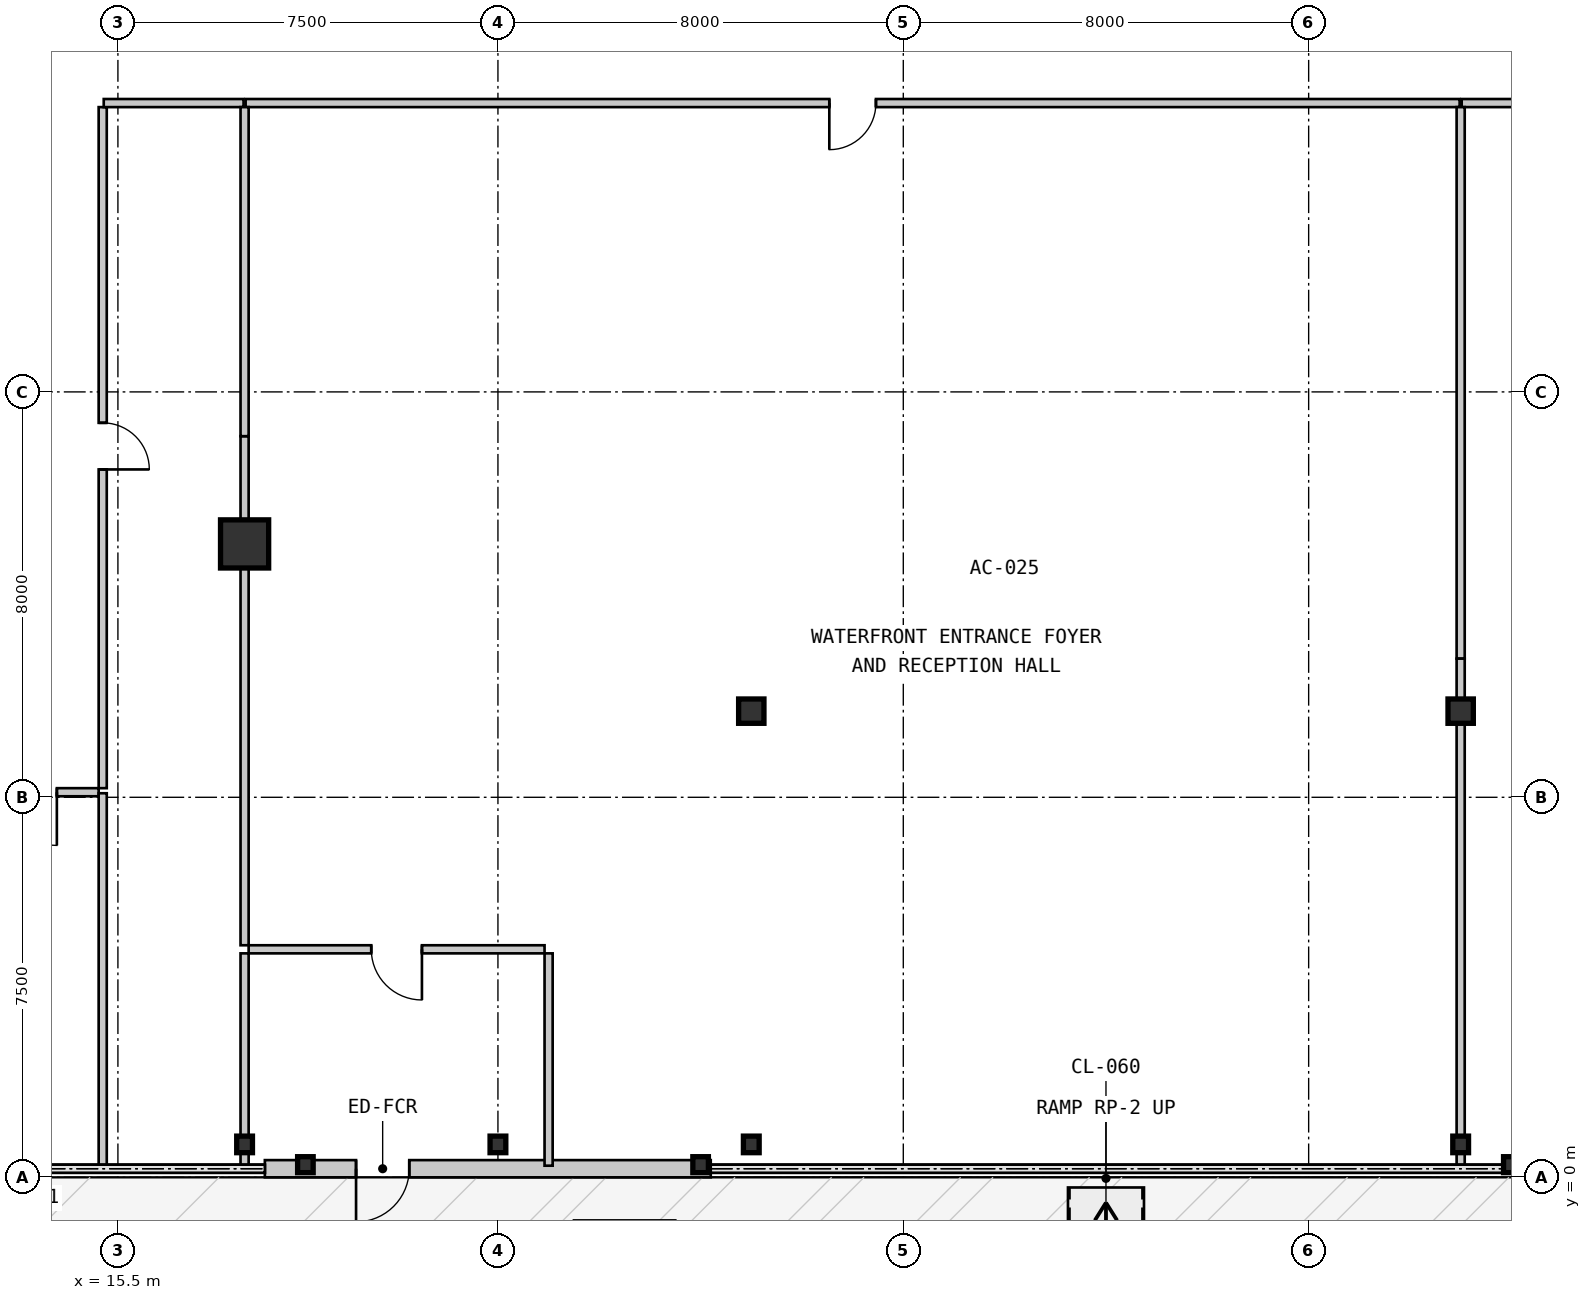
"""IFC4 building model, lengths in metres.
Left out: names, types, materials, properties, quantities, classifications, styles, units other than length and angle.
Written with IfcOpenShell. Run it as: python <this file> out.ifc"""

import sys

from ifc_helpers import new_model, si_unit, direction, frame, frame_2d, origin, origin_2d, place, context, subcontext, project, spatial, rectangle, i_section, extrude, source, transform, mapped, element, fill, save


model = new_model("IFC4")
c1 = context("Model", 3, precision=1e-05, world=origin(), true_north=direction((0.0, 1.0)))
c2 = subcontext(c1, "Body", "Model", "MODEL_VIEW")
j1 = project(units=[si_unit("LENGTHUNIT", "METRE"), si_unit("PLANEANGLEUNIT", "RADIAN")], contexts=[c1])
p1 = place(None, origin())
s1 = spatial("IfcSite", under=j1, at=p1, CompositionType="ELEMENT")
p2 = place(p1, origin())
s2 = spatial("IfcBuilding", under=s1, at=p2, CompositionType="ELEMENT")
p3 = place(p2, origin())
s3 = spatial("IfcBuildingStorey", under=s2, at=p3, CompositionType="ELEMENT", Elevation=0.0)
m1 = source(origin(), c2, "Body", "SweptSolid", [
    extrude(i_section(OverallWidth=0.5, OverallDepth=0.48, WebThickness=0.028, FlangeThickness=0.044, at=origin_2d()), origin(), (0.0, 0.0, 1.0), 4.55),
])
for number, where, z_axis, x_axis in (
    (1, (28.0, 9.2, 0.0), (0.0, 0.0, 1.0), (1.0, 0.0, 0.0)),
    (2, (42.0, 9.2, 0.0), (0.0, 0.0, 1.0), (1.0, 0.0, 0.0)),
):
    element("IfcColumn", number, at=place(p3, frame(where, z_axis=z_axis, x_axis=x_axis)), inside=s3, PredefinedType="COLUMN", context=c2, shape_type="MappedRepresentation", body=[
        mapped(m1, transform((0.0, 0.0, 0.0), scale=1.0)),
    ])
m2 = source(origin(), c2, "Body", "SweptSolid", [
    extrude(rectangle(XDim=0.95, YDim=0.95, at=origin_2d()), origin(), (0.0, 0.0, 1.0), 4.55),
])
p4 = place(p3, frame((18.0, 12.5, 0.0), z_axis=(0.0, 0.0, 1.0), x_axis=(1.0, 0.0, 0.0)))
e3 = element("IfcColumn", 3, at=p4, inside=s3, PredefinedType="COLUMN", context=c2, shape_type="MappedRepresentation", body=[
    mapped(m2, transform((0.0, 0.0, 0.0), scale=1.0)),
])
m3 = source(origin(), c2, "Body", "SweptSolid", [
    extrude(i_section(OverallWidth=0.311, OverallDepth=0.327, WebThickness=0.016, FlangeThickness=0.025, at=origin_2d()), origin(), (0.0, 0.0, 1.0), 4.55),
])
for number, where, z_axis, x_axis in (
    (4, (28.0, 0.65, 0.0), (0.0, 0.0, 1.0), (1.0, 0.0, 0.0)),
    (5, (42.0, 0.65, 0.0), (0.0, 0.0, 1.0), (1.0, 0.0, 0.0)),
    (6, (18.0, 0.65, 0.0), (0.0, 0.0, 1.0), (1.0, 0.0, 0.0)),
    (7, (23.0, 0.65, 0.0), (0.0, 0.0, 1.0), (1.0, 0.0, 0.0)),
):
    element("IfcColumn", number, at=place(p3, frame(where, z_axis=z_axis, x_axis=x_axis)), inside=s3, PredefinedType="COLUMN", context=c2, shape_type="MappedRepresentation", body=[
        mapped(m3, transform((0.0, 0.0, 0.0), scale=1.0)),
    ])
m4 = source(origin(), c2, "Body", "SweptSolid", [
    extrude(i_section(OverallWidth=0.307, OverallDepth=0.315, WebThickness=0.012, FlangeThickness=0.019, at=origin_2d()), origin(), (0.0, 0.0, 1.0), 4.55),
])
for number, where, z_axis, x_axis in (
    (8, (19.2, 0.25, 0.0), (0.0, 0.0, 1.0), (1.0, 0.0, 0.0)),
    (9, (27.0, 0.25, 0.0), (0.0, 0.0, 1.0), (1.0, 0.0, 0.0)),
    (10, (43.0, 0.25, 0.0), (0.0, 0.0, 1.0), (1.0, 0.0, 0.0)),
):
    element("IfcColumn", number, at=place(p3, frame(where, z_axis=z_axis, x_axis=x_axis)), inside=s3, PredefinedType="PILASTER", context=c2, shape_type="MappedRepresentation", body=[
        mapped(m4, transform((0.0, 0.0, 0.0), scale=1.0)),
    ])
m5 = source(origin(), c2, "Body", "SweptSolid", [
    extrude(rectangle(XDim=8.8, YDim=0.34, at=frame_2d((4.4, 0.0))), origin(), (0.0, 0.0, 1.0), 4.29),
])
p5 = place(p3, frame((18.4, 0.17, 0.0), z_axis=(0.0, 0.0, 1.0), x_axis=(1.0, 0.0, 0.0)))
e11 = element("IfcWall", 11, at=p5, inside=s3, PredefinedType="SOLIDWALL", context=c2, shape_type="MappedRepresentation", body=[
    mapped(m5, transform((0.0, 0.0, 0.0), scale=1.0)),
])
m6 = source(origin(), c2, "Body", "SweptSolid", [
    extrude(rectangle(XDim=1.05, YDim=2.15, at=frame_2d((0.525, 1.075))), frame((0.0, 0.18, 0.0), z_axis=(0.0, -1.0, 0.0), x_axis=(1.0, 0.0, 0.0)), (0.0, 0.0, 1.0), 0.36),
])
p6 = place(p5, frame((1.8, 0.0, 0.0)))
e12 = element("IfcOpeningElement", 12, at=p6, cuts=e11, PredefinedType="OPENING", context=c2, shape_type="MappedRepresentation", body=[
    mapped(m6, transform((0.0, 0.0, 0.0), scale=1.0)),
])
m7 = source(origin(), c2, "Body", "SweptSolid", [
    extrude(rectangle(XDim=23.959, YDim=0.16, at=frame_2d((11.98, 0.0))), origin(), (0.0, 0.0, 1.0), 4.29),
])
p7 = place(p3, frame((41.98, 21.2, 0.0), z_axis=(0.0, 0.0, 1.0), x_axis=(-1.0, 0.0, 0.0)))
e13 = element("IfcWall", 13, at=p7, inside=s3, PredefinedType="PARTITIONING", context=c2, shape_type="MappedRepresentation", body=[
    mapped(m7, transform((0.0, 0.0, 0.0), scale=1.0)),
])
m8 = source(origin(), c2, "Body", "SweptSolid", [
    extrude(rectangle(XDim=0.92, YDim=2.1, at=frame_2d((0.46, 1.05))), frame((0.0, 0.09, 0.0), z_axis=(0.0, -1.0, 0.0), x_axis=(1.0, 0.0, 0.0)), (0.0, 0.0, 1.0), 0.18),
])
p8 = place(p7, frame((11.52, 0.0, 0.0)))
e14 = element("IfcOpeningElement", 14, at=p8, cuts=e13, PredefinedType="OPENING", context=c2, shape_type="MappedRepresentation", body=[
    mapped(m8, transform((0.0, 0.0, 0.0), scale=1.0)),
])
m9 = source(origin(), c2, "Body", "SweptSolid", [
    extrude(rectangle(XDim=13.459, YDim=0.16, at=frame_2d((6.73, 0.0))), origin(), (0.0, 0.0, 1.0), 4.29),
])
p9 = place(p3, frame((55.48, 21.2, 0.0), z_axis=(0.0, 0.0, 1.0), x_axis=(-1.0, 0.0, 0.0)))
e15 = element("IfcWall", 15, at=p9, inside=s3, PredefinedType="PARTITIONING", context=c2, shape_type="MappedRepresentation", body=[
    mapped(m9, transform((0.0, 0.0, 0.0), scale=1.0)),
])
m10 = source(origin(), c2, "Body", "SweptSolid", [
    extrude(rectangle(XDim=13.44, YDim=0.16, at=frame_2d((6.72, 0.0))), origin(), (0.0, 0.0, 1.0), 4.29),
])
p10 = place(p3, frame((15.2, 21.12, 0.0), z_axis=(0.0, 0.0, 1.0), x_axis=(0.0, -1.0, 0.0)))
e16 = element("IfcWall", 16, at=p10, inside=s3, PredefinedType="PARTITIONING", context=c2, shape_type="MappedRepresentation", body=[
    mapped(m10, transform((0.0, 0.0, 0.0), scale=1.0)),
])
p11 = place(p10, frame((6.23, 0.0, 0.0)))
e17 = element("IfcOpeningElement", 17, at=p11, cuts=e16, PredefinedType="OPENING", context=c2, shape_type="MappedRepresentation", body=[
    mapped(m8, transform((0.0, 0.0, 0.0), scale=1.0)),
])
m11 = source(origin(), c2, "Body", "SweptSolid", [
    extrude(rectangle(XDim=2.76, YDim=0.16, at=frame_2d((1.38, 0.0))), origin(), (0.0, 0.0, 1.0), 4.29),
])
p12 = place(p3, frame((17.98, 21.2, 0.0), z_axis=(0.0, 0.0, 1.0), x_axis=(-1.0, 0.0, 0.0)))
e18 = element("IfcWall", 18, at=p12, inside=s3, PredefinedType="PARTITIONING", context=c2, shape_type="MappedRepresentation", body=[
    mapped(m11, transform((0.0, 0.0, 0.0), scale=1.0)),
])
m12 = source(origin(), c2, "Body", "SweptSolid", [
    extrude(rectangle(XDim=2.67, YDim=0.16, at=frame_2d((1.335, 0.0))), origin(), (0.0, 0.0, 1.0), 4.29),
])
p13 = place(p3, frame((15.12, 7.6, 0.0), z_axis=(0.0, 0.0, 1.0), x_axis=(-1.0, 0.0, 0.0)))
e19 = element("IfcWall", 19, at=p13, inside=s3, PredefinedType="PARTITIONING", context=c2, shape_type="MappedRepresentation", body=[
    mapped(m12, transform((0.0, 0.0, 0.0), scale=1.0)),
])
m13 = source(origin(), c2, "Body", "SweptSolid", [
    extrude(rectangle(XDim=1.05, YDim=2.1, at=frame_2d((0.525, 1.05))), frame((0.0, 0.09, 0.0), z_axis=(0.0, -1.0, 0.0), x_axis=(1.0, 0.0, 0.0)), (0.0, 0.0, 1.0), 0.18),
])
p14 = place(p13, frame((0.825, 0.0, 0.0)))
e20 = element("IfcOpeningElement", 20, at=p14, cuts=e19, PredefinedType="OPENING", context=c2, shape_type="MappedRepresentation", body=[
    mapped(m13, transform((0.0, 0.0, 0.0), scale=1.0)),
])
m14 = source(origin(), c2, "Body", "SweptSolid", [
    extrude(rectangle(XDim=5.84, YDim=0.16, at=frame_2d((2.92, 0.0))), origin(), (0.0, 0.0, 1.0), 4.29),
])
p15 = place(p3, frame((18.08, 4.5, 0.0), z_axis=(0.0, 0.0, 1.0), x_axis=(1.0, 0.0, 0.0)))
e21 = element("IfcWall", 21, at=p15, inside=s3, PredefinedType="PARTITIONING", context=c2, shape_type="MappedRepresentation", body=[
    mapped(m14, transform((0.0, 0.0, 0.0), scale=1.0)),
])
m15 = source(origin(), c2, "Body", "SweptSolid", [
    extrude(rectangle(XDim=1.0, YDim=2.1, at=frame_2d((0.5, 1.05))), frame((0.0, 0.09, 0.0), z_axis=(0.0, -1.0, 0.0), x_axis=(1.0, 0.0, 0.0)), (0.0, 0.0, 1.0), 0.18),
])
p16 = place(p15, frame((2.42, 0.0, 0.0)))
e22 = element("IfcOpeningElement", 22, at=p16, cuts=e21, PredefinedType="OPENING", context=c2, shape_type="MappedRepresentation", body=[
    mapped(m15, transform((0.0, 0.0, 0.0), scale=1.0)),
])
m16 = source(origin(), c2, "Body", "SweptSolid", [
    extrude(rectangle(XDim=4.19, YDim=0.16, at=frame_2d((2.095, 0.0))), origin(), (0.0, 0.0, 1.0), 4.29),
])
p17 = place(p3, frame((24.0, 4.42, 0.0), z_axis=(0.0, 0.0, 1.0), x_axis=(0.0, -1.0, 0.0)))
e23 = element("IfcWall", 23, at=p17, inside=s3, PredefinedType="PARTITIONING", context=c2, shape_type="MappedRepresentation", body=[
    mapped(m16, transform((0.0, 0.0, 0.0), scale=1.0)),
])
m17 = source(origin(), c2, "Body", "SweptSolid", [
    extrude(rectangle(XDim=0.42, YDim=0.16, at=frame_2d((0.21, 0.0))), origin(), (0.0, 0.0, 1.0), 4.29),
])
p18 = place(p3, frame((18.0, 0.23, 0.0), z_axis=(0.0, 0.0, 1.0), x_axis=(0.0, 1.0, 0.0)))
e24 = element("IfcWall", 24, at=p18, inside=s3, PredefinedType="PARTITIONING", context=c2, shape_type="MappedRepresentation", body=[
    mapped(m17, transform((0.0, 0.0, 0.0), scale=1.0)),
])
m18 = source(origin(), c2, "Body", "SweptSolid", [
    extrude(rectangle(XDim=3.77, YDim=0.16, at=frame_2d((1.885, 0.0))), origin(), (0.0, 0.0, 1.0), 3.757),
])
p19 = place(p3, frame((18.0, 0.65, 0.0), z_axis=(0.0, 0.0, 1.0), x_axis=(0.0, 1.0, 0.0)))
e25 = element("IfcWall", 25, at=p19, inside=s3, PredefinedType="PARTITIONING", context=c2, shape_type="MappedRepresentation", body=[
    mapped(m18, transform((0.0, 0.0, 0.0), scale=1.0)),
])
m19 = source(origin(), c2, "Body", "SweptSolid", [
    extrude(rectangle(XDim=10.884, YDim=0.16, at=frame_2d((5.442, 0.0))), origin(), (0.0, 0.0, 1.0), 4.29),
])
p20 = place(p3, frame((42.0, 21.12, 0.0), z_axis=(0.0, 0.0, 1.0), x_axis=(0.0, -1.0, 0.0)))
e26 = element("IfcWall", 26, at=p20, inside=s3, PredefinedType="PARTITIONING", context=c2, shape_type="MappedRepresentation", body=[
    mapped(m19, transform((0.0, 0.0, 0.0), scale=1.0)),
])
m20 = source(origin(), c2, "Body", "SweptSolid", [
    extrude(rectangle(XDim=1.051, YDim=0.16, at=frame_2d((0.526, 0.0))), origin(), (0.0, 0.0, 1.0), 3.688),
])
p21 = place(p3, frame((42.0, 10.236, 0.0), z_axis=(0.0, 0.0, 1.0), x_axis=(0.0, -1.0, 0.0)))
e27 = element("IfcWall", 27, at=p21, inside=s3, PredefinedType="PARTITIONING", context=c2, shape_type="MappedRepresentation", body=[
    mapped(m20, transform((0.0, 0.0, 0.0), scale=1.0)),
])
m21 = source(origin(), c2, "Body", "SweptSolid", [
    extrude(rectangle(XDim=8.535, YDim=0.16, at=frame_2d((4.268, 0.0))), origin(), (0.0, 0.0, 1.0), 3.757),
])
p22 = place(p3, frame((42.0, 9.185, 0.0), z_axis=(0.0, 0.0, 1.0), x_axis=(0.0, -1.0, 0.0)))
e28 = element("IfcWall", 28, at=p22, inside=s3, PredefinedType="PARTITIONING", context=c2, shape_type="MappedRepresentation", body=[
    mapped(m21, transform((0.0, 0.0, 0.0), scale=1.0)),
])
p23 = place(p3, frame((42.0, 0.65, 0.0), z_axis=(0.0, 0.0, 1.0), x_axis=(0.0, -1.0, 0.0)))
e29 = element("IfcWall", 29, at=p23, inside=s3, PredefinedType="PARTITIONING", context=c2, shape_type="MappedRepresentation", body=[
    mapped(m17, transform((0.0, 0.0, 0.0), scale=1.0)),
])
m22 = source(origin(), c2, "Body", "SweptSolid", [
    extrude(rectangle(XDim=10.046, YDim=0.16, at=frame_2d((5.023, 0.0))), origin(), (0.0, 0.0, 1.0), 3.757),
])
p24 = place(p3, frame((18.0, 4.58, 0.0), z_axis=(0.0, 0.0, 1.0), x_axis=(0.0, 1.0, 0.0)))
e30 = element("IfcWall", 30, at=p24, inside=s3, PredefinedType="PARTITIONING", context=c2, shape_type="MappedRepresentation", body=[
    mapped(m22, transform((0.0, 0.0, 0.0), scale=1.0)),
])
m23 = source(origin(), c2, "Body", "SweptSolid", [
    extrude(rectangle(XDim=6.494, YDim=0.16, at=frame_2d((3.247, 0.0))), origin(), (0.0, 0.0, 1.0), 4.29),
])
p25 = place(p3, frame((18.0, 14.626, 0.0), z_axis=(0.0, 0.0, 1.0), x_axis=(0.0, 1.0, 0.0)))
e31 = element("IfcWall", 31, at=p25, inside=s3, PredefinedType="PARTITIONING", context=c2, shape_type="MappedRepresentation", body=[
    mapped(m23, transform((0.0, 0.0, 0.0), scale=1.0)),
])
m24 = source(origin(), c2, "Body", "SweptSolid", [
    extrude(rectangle(XDim=7.35, YDim=0.16, at=frame_2d((3.675, 0.0))), origin(), (0.0, 0.0, 1.0), 4.29),
])
p26 = place(p3, frame((15.2, 0.23, 0.0), z_axis=(0.0, 0.0, 1.0), x_axis=(0.0, 1.0, 0.0)))
e32 = element("IfcWall", 32, at=p26, inside=s3, PredefinedType="PARTITIONING", context=c2, shape_type="MappedRepresentation", body=[
    mapped(m24, transform((0.0, 0.0, 0.0), scale=1.0)),
])
m25 = source(origin(), c2, "Body", "SweptSolid", [
    extrude(rectangle(XDim=1.05, YDim=2.15, at=frame_2d((0.525, 1.075))), frame((0.0, 0.025, 0.0), z_axis=(0.0, -1.0, 0.0), x_axis=(1.0, 0.0, 0.0)), (0.0, 0.0, 1.0), 0.05),
])
p27 = place(p6, frame((1.05, 0.0, 0.0), z_axis=(0.0, 0.0, 1.0), x_axis=(-1.0, 0.0, 0.0)))
e33 = element("IfcDoor", 33, at=p27, inside=s3, OperationType="SINGLE_SWING_RIGHT", PredefinedType="DOOR", context=c2, shape_type="MappedRepresentation", body=[
    mapped(m25, transform((0.0, 0.0, 0.0), scale=1.0)),
])
fill(e12, e33)
p28 = place(p3, frame((0.0, 0.0, 3.72)))
p29 = place(p28, frame((25.5, -1.45, 0.13)))
e34 = element("IfcWindow", 34, at=p29, inside=s3, PartitioningType="SINGLE_PANEL", PredefinedType="SKYLIGHT", context=c2, shape_type="SweptSolid", body=[
    extrude(rectangle(XDim=2.0, YDim=1.2, at=origin_2d()), origin(), (0.0, 0.0, 1.0), 0.05),
])
m26 = source(origin(), c2, "Body", "SweptSolid", [
    extrude(rectangle(XDim=0.92, YDim=2.1, at=frame_2d((0.46, 1.05))), frame((0.0, 0.025, 0.0), z_axis=(0.0, -1.0, 0.0), x_axis=(1.0, 0.0, 0.0)), (0.0, 0.0, 1.0), 0.05),
])
p30 = place(p8, origin())
e35 = element("IfcDoor", 35, at=p30, inside=s3, OperationType="SINGLE_SWING_RIGHT", PredefinedType="DOOR", context=c2, shape_type="MappedRepresentation", body=[
    mapped(m26, transform((0.0, 0.0, 0.0), scale=1.0)),
])
fill(e14, e35)
p31 = place(p11, origin())
e36 = element("IfcDoor", 36, at=p31, inside=s3, OperationType="SINGLE_SWING_RIGHT", PredefinedType="DOOR", context=c2, shape_type="MappedRepresentation", body=[
    mapped(m26, transform((0.0, 0.0, 0.0), scale=1.0)),
])
fill(e17, e36)
m27 = source(origin(), c2, "Body", "SweptSolid", [
    extrude(rectangle(XDim=1.05, YDim=2.1, at=frame_2d((0.525, 1.05))), frame((0.0, 0.025, 0.0), z_axis=(0.0, -1.0, 0.0), x_axis=(1.0, 0.0, 0.0)), (0.0, 0.0, 1.0), 0.05),
])
p32 = place(p14, origin())
e37 = element("IfcDoor", 37, at=p32, inside=s3, OperationType="SINGLE_SWING_LEFT", PredefinedType="DOOR", context=c2, shape_type="MappedRepresentation", body=[
    mapped(m27, transform((0.0, 0.0, 0.0), scale=1.0)),
])
fill(e20, e37)
m28 = source(origin(), c2, "Body", "SweptSolid", [
    extrude(rectangle(XDim=1.0, YDim=2.1, at=frame_2d((0.5, 1.05))), frame((0.0, 0.025, 0.0), z_axis=(0.0, -1.0, 0.0), x_axis=(1.0, 0.0, 0.0)), (0.0, 0.0, 1.0), 0.05),
])
p33 = place(p16, frame((1.0, 0.0, 0.0), z_axis=(0.0, 0.0, 1.0), x_axis=(-1.0, 0.0, 0.0)))
e38 = element("IfcDoor", 38, at=p33, inside=s3, OperationType="SINGLE_SWING_LEFT", PredefinedType="DOOR", context=c2, shape_type="MappedRepresentation", body=[
    mapped(m28, transform((0.0, 0.0, 0.0), scale=1.0)),
])
fill(e22, e38)
save(model, sys.argv[1])
